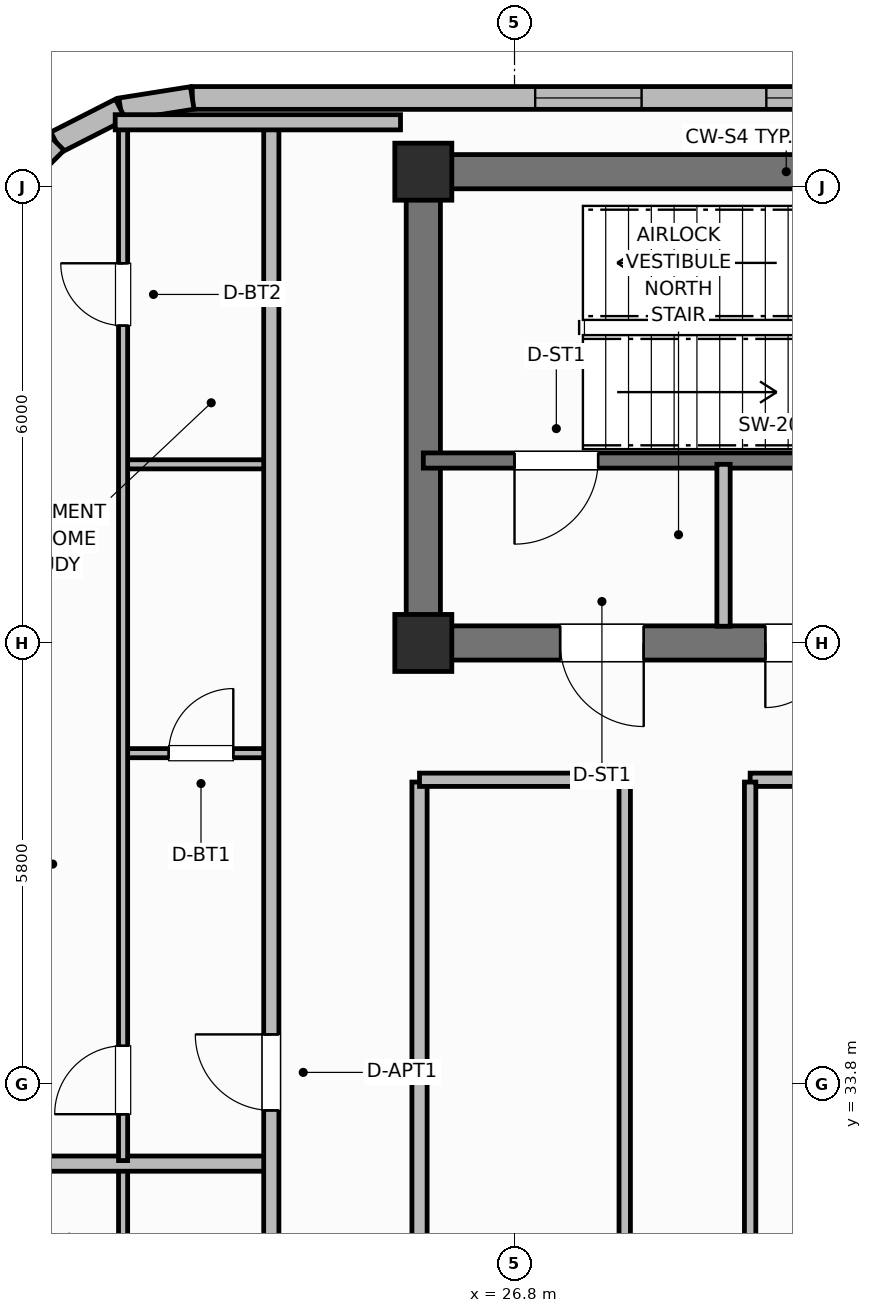
"""IFC4 building model, lengths in metres.
Left out: names, types, materials, properties, quantities, classifications, styles, units other than length and angle.
Written with IfcOpenShell. Run it as: python <this file> out.ifc"""

import sys

from ifc_helpers import new_model, si_unit, direction, frame, frame_2d, origin, origin_2d, place, context, subcontext, project, spatial, rectangle, extrude, element, fill, save


model = new_model("IFC4")
c1 = context("Model", 3, precision=1e-05, world=origin(), true_north=direction((0.0, 1.0)))
c2 = subcontext(c1, "Body", "Model", "MODEL_VIEW")
j1 = project(units=[si_unit("LENGTHUNIT", "METRE"), si_unit("PLANEANGLEUNIT", "RADIAN")], contexts=[c1])
p1 = place(None, origin())
s1 = spatial("IfcSite", under=j1, at=p1, CompositionType="ELEMENT")
p2 = place(p1, origin())
s2 = spatial("IfcBuilding", under=s1, at=p2, CompositionType="ELEMENT")
p3 = place(p2, frame((0.0, 0.0, 293.5)))
s3 = spatial("IfcBuildingStorey", under=s2, at=p3, CompositionType="ELEMENT", Elevation=293.5)
p4 = place(p3, frame((25.6, 45.8, 0.0), z_axis=(0.0, 0.0, 1.0), x_axis=(1.0, 0.0, 0.0)))
e1 = element("IfcWall", 1, at=p4, inside=s3, PredefinedType="SHEAR", context=c2, shape_type="SweptSolid", body=[
    extrude(rectangle(XDim=27.2, YDim=0.45, at=frame_2d((13.6, 0.0))), origin(), (0.0, 0.0, 1.0), 3.7),
])
p5 = place(p3, frame((25.6, 39.825, 0.0), z_axis=(0.0, 0.0, 1.0), x_axis=(0.0, 1.0, 0.0)))
e2 = element("IfcWall", 2, at=p5, inside=s3, PredefinedType="SHEAR", context=c2, shape_type="SweptSolid", body=[
    extrude(rectangle(XDim=5.75, YDim=0.45, at=frame_2d((2.875, 0.0))), origin(), (0.0, 0.0, 1.0), 3.7),
])
p6 = place(p3, frame((52.8, 39.6, 0.0), z_axis=(0.0, 0.0, 1.0), x_axis=(-1.0, 0.0, 0.0)))
e3 = element("IfcWall", 3, at=p6, inside=s3, PredefinedType="SHEAR", context=c2, shape_type="SweptSolid", body=[
    extrude(rectangle(XDim=27.2, YDim=0.45, at=frame_2d((13.6, 0.0))), origin(), (0.0, 0.0, 1.0), 3.7),
])
p7 = place(p6, frame((24.3, 0.0, 0.0)))
e4 = element("IfcOpeningElement", 4, at=p7, cuts=e3, PredefinedType="OPENING", context=c2, shape_type="SweptSolid", body=[
    extrude(rectangle(XDim=1.1, YDim=2.15, at=frame_2d((0.55, 1.075))), frame((0.0, 0.235, 0.0), z_axis=(0.0, -1.0, 0.0), x_axis=(1.0, 0.0, 0.0)), (0.0, 0.0, 1.0), 0.47),
])
p8 = place(p6, frame((21.85, 0.0, 0.0)))
e5 = element("IfcOpeningElement", 5, at=p8, cuts=e3, PredefinedType="OPENING", context=c2, shape_type="SweptSolid", body=[
    extrude(rectangle(XDim=0.85, YDim=2.1, at=frame_2d((0.425, 1.05))), frame((0.0, 0.235, 0.0), z_axis=(0.0, -1.0, 0.0), x_axis=(1.0, 0.0, 0.0)), (0.0, 0.0, 1.0), 0.47),
])
p9 = place(p6, frame((19.85, 0.0, 0.0)))
e6 = element("IfcOpeningElement", 6, at=p9, cuts=e3, PredefinedType="OPENING", context=c2, shape_type="SweptSolid", body=[
    extrude(rectangle(XDim=0.85, YDim=2.1, at=frame_2d((0.425, 1.05))), frame((0.0, 0.235, 0.0), z_axis=(0.0, -1.0, 0.0), x_axis=(1.0, 0.0, 0.0)), (0.0, 0.0, 1.0), 0.47),
])
p10 = place(p6, frame((15.1, 0.0, 0.0)))
e7 = element("IfcOpeningElement", 7, at=p10, cuts=e3, PredefinedType="OPENING", context=c2, shape_type="SweptSolid", body=[
    extrude(rectangle(XDim=1.2, YDim=2.15, at=frame_2d((0.6, 1.075))), frame((0.0, 0.235, 0.0), z_axis=(0.0, -1.0, 0.0), x_axis=(1.0, 0.0, 0.0)), (0.0, 0.0, 1.0), 0.47),
])
p11 = place(p6, frame((12.6, 0.0, 0.0)))
e8 = element("IfcOpeningElement", 8, at=p11, cuts=e3, PredefinedType="OPENING", context=c2, shape_type="SweptSolid", body=[
    extrude(rectangle(XDim=0.85, YDim=2.1, at=frame_2d((0.425, 1.05))), frame((0.0, 0.235, 0.0), z_axis=(0.0, -1.0, 0.0), x_axis=(1.0, 0.0, 0.0)), (0.0, 0.0, 1.0), 0.47),
])
p12 = place(p6, frame((10.85, 0.0, 0.0)))
e9 = element("IfcOpeningElement", 9, at=p12, cuts=e3, PredefinedType="OPENING", context=c2, shape_type="SweptSolid", body=[
    extrude(rectangle(XDim=0.85, YDim=2.1, at=frame_2d((0.425, 1.05))), frame((0.0, 0.235, 0.0), z_axis=(0.0, -1.0, 0.0), x_axis=(1.0, 0.0, 0.0)), (0.0, 0.0, 1.0), 0.47),
])
p13 = place(p6, frame((7.35, 0.0, 0.0)))
e10 = element("IfcOpeningElement", 10, at=p13, cuts=e3, PredefinedType="OPENING", context=c2, shape_type="SweptSolid", body=[
    extrude(rectangle(XDim=0.85, YDim=2.1, at=frame_2d((0.425, 1.05))), frame((0.0, 0.235, 0.0), z_axis=(0.0, -1.0, 0.0), x_axis=(1.0, 0.0, 0.0)), (0.0, 0.0, 1.0), 0.47),
])
p14 = place(p6, frame((4.2, 0.0, 0.0)))
e11 = element("IfcOpeningElement", 11, at=p14, cuts=e3, PredefinedType="OPENING", context=c2, shape_type="SweptSolid", body=[
    extrude(rectangle(XDim=1.3, YDim=2.2, at=frame_2d((0.65, 1.1))), frame((0.0, 0.235, 0.0), z_axis=(0.0, -1.0, 0.0), x_axis=(1.0, 0.0, 0.0)), (0.0, 0.0, 1.0), 0.47),
])
for number, where, z_axis, x_axis in (
    (12, (25.6, 39.6, 0.0), (0.0, 0.0, 1.0), (1.0, 0.0, 0.0)),
    (13, (25.6, 45.8, 0.0), (0.0, 0.0, 1.0), (1.0, 0.0, 0.0)),
):
    element("IfcColumn", number, at=place(p3, frame(where, z_axis=z_axis, x_axis=x_axis)), inside=s3, PredefinedType="COLUMN", context=c2, shape_type="SweptSolid", body=[
        extrude(rectangle(XDim=0.75, YDim=0.75, at=origin_2d()), origin(), (0.0, 0.0, 1.0), 3.7),
    ])
p15 = place(p3, frame((48.19, 46.77, 0.0), z_axis=(0.0, 0.0, 1.0), x_axis=(-1.0, 0.0, 0.0)))
e14 = element("IfcWall", 14, at=p15, inside=s3, PredefinedType="SOLIDWALL", context=c2, shape_type="SweptSolid", body=[
    extrude(rectangle(XDim=25.63, YDim=0.3, at=frame_2d((12.815, 0.0))), origin(), (0.0, 0.0, 1.0), 2.71),
])
p16 = place(p15, frame((1.471, 0.0, 0.74)))
e15 = element("IfcOpeningElement", 15, at=p16, cuts=e14, PredefinedType="OPENING", context=c2, shape_type="SweptSolid", body=[
    extrude(rectangle(XDim=1.4, YDim=1.85, at=frame_2d((0.7, 0.925))), frame((0.0, 0.16, 0.0), z_axis=(0.0, -1.0, 0.0), x_axis=(1.0, 0.0, 0.0)), (0.0, 0.0, 1.0), 0.32),
])
p17 = place(p15, frame((7.553, 0.0, 0.74)))
e16 = element("IfcOpeningElement", 16, at=p17, cuts=e14, PredefinedType="OPENING", context=c2, shape_type="SweptSolid", body=[
    extrude(rectangle(XDim=1.4, YDim=1.85, at=frame_2d((0.7, 0.925))), frame((0.0, 0.16, 0.0), z_axis=(0.0, -1.0, 0.0), x_axis=(1.0, 0.0, 0.0)), (0.0, 0.0, 1.0), 0.32),
])
p18 = place(p15, frame((10.244, 0.0, 0.74)))
e17 = element("IfcOpeningElement", 17, at=p18, cuts=e14, PredefinedType="OPENING", context=c2, shape_type="SweptSolid", body=[
    extrude(rectangle(XDim=1.4, YDim=1.85, at=frame_2d((0.7, 0.925))), frame((0.0, 0.16, 0.0), z_axis=(0.0, -1.0, 0.0), x_axis=(1.0, 0.0, 0.0)), (0.0, 0.0, 1.0), 0.32),
])
p19 = place(p15, frame((14.336, 0.0, 0.74)))
e18 = element("IfcOpeningElement", 18, at=p19, cuts=e14, PredefinedType="OPENING", context=c2, shape_type="SweptSolid", body=[
    extrude(rectangle(XDim=1.4, YDim=1.85, at=frame_2d((0.7, 0.925))), frame((0.0, 0.16, 0.0), z_axis=(0.0, -1.0, 0.0), x_axis=(1.0, 0.0, 0.0)), (0.0, 0.0, 1.0), 0.32),
])
p20 = place(p15, frame((16.677, 0.0, 0.74)))
e19 = element("IfcOpeningElement", 19, at=p20, cuts=e14, PredefinedType="OPENING", context=c2, shape_type="SweptSolid", body=[
    extrude(rectangle(XDim=1.4, YDim=1.85, at=frame_2d((0.7, 0.925))), frame((0.0, 0.16, 0.0), z_axis=(0.0, -1.0, 0.0), x_axis=(1.0, 0.0, 0.0)), (0.0, 0.0, 1.0), 0.32),
])
p21 = place(p15, frame((19.718, 0.0, 0.74)))
e20 = element("IfcOpeningElement", 20, at=p21, cuts=e14, PredefinedType="OPENING", context=c2, shape_type="SweptSolid", body=[
    extrude(rectangle(XDim=1.4, YDim=1.85, at=frame_2d((0.7, 0.925))), frame((0.0, 0.16, 0.0), z_axis=(0.0, -1.0, 0.0), x_axis=(1.0, 0.0, 0.0)), (0.0, 0.0, 1.0), 0.32),
])
p22 = place(p3, frame((22.56, 46.77, 0.0), z_axis=(0.0, 0.0, 1.0), x_axis=(-0.987669453596, -0.156553666304, 0.0)))
e21 = element("IfcWall", 21, at=p22, inside=s3, PredefinedType="SOLIDWALL", context=c2, shape_type="SweptSolid", body=[
    extrude(rectangle(XDim=0.954, YDim=0.3, at=frame_2d((0.477, 0.0))), origin(), (0.0, 0.0, 1.0), 2.71),
])
p23 = place(p3, frame((21.617, 46.621, 0.0), z_axis=(0.0, 0.0, 1.0), x_axis=(-0.891023873617, -0.45395644796, 0.0)))
e22 = element("IfcWall", 22, at=p23, inside=s3, PredefinedType="SOLIDWALL", context=c2, shape_type="SweptSolid", body=[
    extrude(rectangle(XDim=0.954, YDim=0.3, at=frame_2d((0.477, 0.0))), origin(), (0.0, 0.0, 1.0), 2.71),
])
p24 = place(p3, frame((20.767, 46.188, 0.0), z_axis=(0.0, 0.0, 1.0), x_axis=(-0.707106781187, -0.707106781187, 0.0)))
e23 = element("IfcWall", 23, at=p24, inside=s3, PredefinedType="SOLIDWALL", context=c2, shape_type="SweptSolid", body=[
    extrude(rectangle(XDim=0.954, YDim=0.3, at=frame_2d((0.477, 0.0))), origin(), (0.0, 0.0, 1.0), 2.71),
])
p25 = place(p3, frame((35.15, 42.0, 0.0), z_axis=(0.0, 0.0, 1.0), x_axis=(-1.0, 0.0, 0.0)))
e24 = element("IfcWall", 24, at=p25, inside=s3, PredefinedType="SHEAR", context=c2, shape_type="SweptSolid", body=[
    extrude(rectangle(XDim=9.55, YDim=0.2, at=frame_2d((4.775, 0.0))), origin(), (0.0, 0.0, 1.0), 3.7),
])
p26 = place(p25, frame((7.25, 0.0, 0.0)))
e25 = element("IfcOpeningElement", 25, at=p26, cuts=e24, PredefinedType="OPENING", context=c2, shape_type="SweptSolid", body=[
    extrude(rectangle(XDim=1.1, YDim=2.15, at=frame_2d((0.55, 1.075))), frame((0.0, 0.11, 0.0), z_axis=(0.0, -1.0, 0.0), x_axis=(1.0, 0.0, 0.0)), (0.0, 0.0, 1.0), 0.22),
])
p27 = place(p3, frame((29.55, 39.82, 0.0), z_axis=(0.0, 0.0, 1.0), x_axis=(0.0, 1.0, 0.0)))
e26 = element("IfcWall", 26, at=p27, inside=s3, PredefinedType="PARTITIONING", context=c2, shape_type="SweptSolid", body=[
    extrude(rectangle(XDim=2.13, YDim=0.175, at=frame_2d((1.065, 0.0))), origin(), (0.0, 0.0, 1.0), 2.54),
])
p28 = place(p3, frame((25.55, 18.63, 0.0), z_axis=(0.0, 0.0, 1.0), x_axis=(0.0, 1.0, 0.0)))
e27 = element("IfcWall", 27, at=p28, inside=s3, PredefinedType="PARTITIONING", context=c2, shape_type="SweptSolid", body=[
    extrude(rectangle(XDim=19.14, YDim=0.2, at=frame_2d((9.57, 0.0))), origin(), (0.0, 0.0, 1.0), 2.54),
])
p29 = place(p3, frame((25.55, 37.8, 0.0), z_axis=(0.0, 0.0, 1.0), x_axis=(1.0, 0.0, 0.0)))
e28 = element("IfcWall", 28, at=p29, inside=s3, PredefinedType="PARTITIONING", context=c2, shape_type="SweptSolid", body=[
    extrude(rectangle(XDim=2.7, YDim=0.175, at=frame_2d((1.35, 0.0))), origin(), (0.0, 0.0, 1.0), 2.54),
])
p30 = place(p3, frame((29.9, 37.8, 0.0), z_axis=(0.0, 0.0, 1.0), x_axis=(1.0, 0.0, 0.0)))
e29 = element("IfcWall", 29, at=p30, inside=s3, PredefinedType="PARTITIONING", context=c2, shape_type="SweptSolid", body=[
    extrude(rectangle(XDim=22.95, YDim=0.175, at=frame_2d((11.475, 0.0))), origin(), (0.0, 0.0, 1.0), 2.54),
])
p31 = place(p3, frame((28.25, 18.63, 0.0), z_axis=(0.0, 0.0, 1.0), x_axis=(0.0, 1.0, 0.0)))
e30 = element("IfcWall", 30, at=p31, inside=s3, PredefinedType="PARTITIONING", context=c2, shape_type="SweptSolid", body=[
    extrude(rectangle(XDim=19.14, YDim=0.15, at=frame_2d((9.57, 0.0))), origin(), (0.0, 0.0, 1.0), 2.54),
])
p32 = place(p31, frame((3.0, 0.0, 0.0)))
e31 = element("IfcOpeningElement", 31, at=p32, cuts=e30, PredefinedType="OPENING", context=c2, shape_type="SweptSolid", body=[
    extrude(rectangle(XDim=0.9, YDim=2.1, at=frame_2d((0.45, 1.05))), frame((0.0, 0.085, 0.0), z_axis=(0.0, -1.0, 0.0), x_axis=(1.0, 0.0, 0.0)), (0.0, 0.0, 1.0), 0.17),
])
p33 = place(p31, frame((11.5, 0.0, 0.0)))
e32 = element("IfcOpeningElement", 32, at=p33, cuts=e30, PredefinedType="OPENING", context=c2, shape_type="SweptSolid", body=[
    extrude(rectangle(XDim=0.9, YDim=2.1, at=frame_2d((0.45, 1.05))), frame((0.0, 0.085, 0.0), z_axis=(0.0, -1.0, 0.0), x_axis=(1.0, 0.0, 0.0)), (0.0, 0.0, 1.0), 0.17),
])
p34 = place(p3, frame((29.9, 18.63, 0.0), z_axis=(0.0, 0.0, 1.0), x_axis=(0.0, 1.0, 0.0)))
e33 = element("IfcWall", 33, at=p34, inside=s3, PredefinedType="PARTITIONING", context=c2, shape_type="SweptSolid", body=[
    extrude(rectangle(XDim=19.14, YDim=0.15, at=frame_2d((9.57, 0.0))), origin(), (0.0, 0.0, 1.0), 2.54),
])
p35 = place(p34, frame((2.2, 0.0, 0.0)))
e34 = element("IfcOpeningElement", 34, at=p35, cuts=e33, PredefinedType="OPENING", context=c2, shape_type="SweptSolid", body=[
    extrude(rectangle(XDim=1.0, YDim=2.15, at=frame_2d((0.5, 1.075))), frame((0.0, 0.085, 0.0), z_axis=(0.0, -1.0, 0.0), x_axis=(1.0, 0.0, 0.0)), (0.0, 0.0, 1.0), 0.17),
])
p36 = place(p34, frame((8.89, 0.0, 0.0)))
e35 = element("IfcOpeningElement", 35, at=p36, cuts=e33, PredefinedType="OPENING", context=c2, shape_type="SweptSolid", body=[
    extrude(rectangle(XDim=1.0, YDim=2.15, at=frame_2d((0.5, 1.075))), frame((0.0, 0.085, 0.0), z_axis=(0.0, -1.0, 0.0), x_axis=(1.0, 0.0, 0.0)), (0.0, 0.0, 1.0), 0.17),
])
p37 = place(p3, frame((21.65, 9.99, 0.0), z_axis=(0.0, 0.0, 1.0), x_axis=(0.0, 1.0, 0.0)))
e36 = element("IfcWall", 36, at=p37, inside=s3, PredefinedType="PARTITIONING", context=c2, shape_type="SweptSolid", body=[
    extrude(rectangle(XDim=22.72, YDim=0.12, at=frame_2d((11.36, 0.0))), origin(), (0.0, 0.0, 1.0), 2.54),
])
p38 = place(p37, frame((0.41, 0.0, 0.0)))
e37 = element("IfcOpeningElement", 37, at=p38, cuts=e36, PredefinedType="OPENING", context=c2, shape_type="SweptSolid", body=[
    extrude(rectangle(XDim=0.9, YDim=2.1, at=frame_2d((0.45, 1.05))), frame((0.0, 0.07, 0.0), z_axis=(0.0, -1.0, 0.0), x_axis=(1.0, 0.0, 0.0)), (0.0, 0.0, 1.0), 0.14),
])
p39 = place(p37, frame((15.535, 0.0, 0.0)))
e38 = element("IfcOpeningElement", 38, at=p39, cuts=e36, PredefinedType="OPENING", context=c2, shape_type="SweptSolid", body=[
    extrude(rectangle(XDim=0.82, YDim=2.08, at=frame_2d((0.41, 1.04))), frame((0.0, 0.07, 0.0), z_axis=(0.0, -1.0, 0.0), x_axis=(1.0, 0.0, 0.0)), (0.0, 0.0, 1.0), 0.14),
])
p40 = place(p3, frame((19.53, 32.75, 0.0), z_axis=(0.0, 0.0, 1.0), x_axis=(1.0, 0.0, 0.0)))
e39 = element("IfcWall", 39, at=p40, inside=s3, PredefinedType="PARTITIONING", context=c2, shape_type="SweptSolid", body=[
    extrude(rectangle(XDim=4.07, YDim=0.2, at=frame_2d((2.035, 0.0))), origin(), (0.0, 0.0, 1.0), 2.54),
])
p41 = place(p3, frame((21.65, 38.15, 0.0), z_axis=(0.0, 0.0, 1.0), x_axis=(1.0, 0.0, 0.0)))
e40 = element("IfcWall", 40, at=p41, inside=s3, PredefinedType="PARTITIONING", context=c2, shape_type="SweptSolid", body=[
    extrude(rectangle(XDim=1.95, YDim=0.12, at=frame_2d((0.975, 0.0))), origin(), (0.0, 0.0, 1.0), 2.54),
])
p42 = place(p41, frame((0.6, 0.0, 0.0)))
e41 = element("IfcOpeningElement", 41, at=p42, cuts=e40, PredefinedType="OPENING", context=c2, shape_type="SweptSolid", body=[
    extrude(rectangle(XDim=0.85, YDim=2.1, at=frame_2d((0.425, 1.05))), frame((0.0, 0.07, 0.0), z_axis=(0.0, -1.0, 0.0), x_axis=(1.0, 0.0, 0.0)), (0.0, 0.0, 1.0), 0.14),
])
p43 = place(p3, frame((21.65, 41.95, 0.0), z_axis=(0.0, 0.0, 1.0), x_axis=(1.0, 0.0, 0.0)))
e42 = element("IfcWall", 42, at=p43, inside=s3, PredefinedType="PARTITIONING", context=c2, shape_type="SweptSolid", body=[
    extrude(rectangle(XDim=1.95, YDim=0.12, at=frame_2d((0.975, 0.0))), origin(), (0.0, 0.0, 1.0), 2.54),
])
p44 = place(p3, frame((21.65, 32.79, 0.0), z_axis=(0.0, 0.0, 1.0), x_axis=(0.0, 1.0, 0.0)))
e43 = element("IfcWall", 43, at=p44, inside=s3, PredefinedType="PARTITIONING", context=c2, shape_type="SweptSolid", body=[
    extrude(rectangle(XDim=13.62, YDim=0.12, at=frame_2d((6.81, 0.0))), origin(), (0.0, 0.0, 1.0), 2.54),
])
p45 = place(p44, frame((0.61, 0.0, 0.0)))
e44 = element("IfcOpeningElement", 44, at=p45, cuts=e43, PredefinedType="OPENING", context=c2, shape_type="SweptSolid", body=[
    extrude(rectangle(XDim=0.9, YDim=2.1, at=frame_2d((0.45, 1.05))), frame((0.0, 0.07, 0.0), z_axis=(0.0, -1.0, 0.0), x_axis=(1.0, 0.0, 0.0)), (0.0, 0.0, 1.0), 0.14),
])
p46 = place(p44, frame((10.985, 0.0, 0.0)))
e45 = element("IfcOpeningElement", 45, at=p46, cuts=e43, PredefinedType="OPENING", context=c2, shape_type="SweptSolid", body=[
    extrude(rectangle(XDim=0.82, YDim=2.08, at=frame_2d((0.41, 1.04))), frame((0.0, 0.07, 0.0), z_axis=(0.0, -1.0, 0.0), x_axis=(1.0, 0.0, 0.0)), (0.0, 0.0, 1.0), 0.14),
])
p47 = place(p3, frame((23.6, 9.95, 0.0), z_axis=(0.0, 0.0, 1.0), x_axis=(0.0, 1.0, 0.0)))
e46 = element("IfcWall", 46, at=p47, inside=s3, PredefinedType="PARTITIONING", context=c2, shape_type="SweptSolid", body=[
    extrude(rectangle(XDim=36.5, YDim=0.2, at=frame_2d((18.25, 0.0))), origin(), (0.0, 0.0, 1.0), 2.54),
])
p48 = place(p47, frame((3.25, 0.0, 0.0)))
e47 = element("IfcOpeningElement", 47, at=p48, cuts=e46, PredefinedType="OPENING", context=c2, shape_type="SweptSolid", body=[
    extrude(rectangle(XDim=1.0, YDim=2.15, at=frame_2d((0.5, 1.075))), frame((0.0, 0.11, 0.0), z_axis=(0.0, -1.0, 0.0), x_axis=(1.0, 0.0, 0.0)), (0.0, 0.0, 1.0), 0.22),
])
p49 = place(p47, frame((23.5, 0.0, 0.0)))
e48 = element("IfcOpeningElement", 48, at=p49, cuts=e46, PredefinedType="OPENING", context=c2, shape_type="SweptSolid", body=[
    extrude(rectangle(XDim=1.0, YDim=2.15, at=frame_2d((0.5, 1.075))), frame((0.0, 0.11, 0.0), z_axis=(0.0, -1.0, 0.0), x_axis=(1.0, 0.0, 0.0)), (0.0, 0.0, 1.0), 0.22),
])
p50 = place(p3, frame((21.546, 46.45, 0.0), z_axis=(0.0, 0.0, 1.0), x_axis=(1.0, 0.0, 0.0)))
e49 = element("IfcWall", 49, at=p50, inside=s3, PredefinedType="PARTITIONING", context=c2, shape_type="SweptSolid", body=[
    extrude(rectangle(XDim=3.754, YDim=0.2, at=frame_2d((1.877, 0.0))), origin(), (0.0, 0.0, 1.0), 2.54),
])
p51 = place(p20, origin())
e50 = element("IfcWindow", 50, at=p51, inside=s3, PartitioningType="SINGLE_PANEL", PredefinedType="WINDOW", context=c2, shape_type="SweptSolid", body=[
    extrude(rectangle(XDim=1.4, YDim=1.85, at=frame_2d((0.7, 0.925))), frame((0.0, 0.03, 0.0), z_axis=(0.0, -1.0, 0.0), x_axis=(1.0, 0.0, 0.0)), (0.0, 0.0, 1.0), 0.06),
])
fill(e19, e50)
p52 = place(p21, origin())
e51 = element("IfcWindow", 51, at=p52, inside=s3, PartitioningType="SINGLE_PANEL", PredefinedType="WINDOW", context=c2, shape_type="SweptSolid", body=[
    extrude(rectangle(XDim=1.4, YDim=1.85, at=frame_2d((0.7, 0.925))), frame((0.0, 0.03, 0.0), z_axis=(0.0, -1.0, 0.0), x_axis=(1.0, 0.0, 0.0)), (0.0, 0.0, 1.0), 0.06),
])
fill(e20, e51)
p53 = place(p26, origin())
e52 = element("IfcDoor", 52, at=p53, inside=s3, OperationType="SINGLE_SWING_RIGHT", PredefinedType="DOOR", context=c2, shape_type="SweptSolid", body=[
    extrude(rectangle(XDim=1.1, YDim=2.15, at=frame_2d((0.55, 1.075))), frame((0.0, 0.025, 0.0), z_axis=(0.0, -1.0, 0.0), x_axis=(1.0, 0.0, 0.0)), (0.0, 0.0, 1.0), 0.05),
])
fill(e25, e52)
p54 = place(p42, origin())
e53 = element("IfcDoor", 53, at=p54, inside=s3, OperationType="SINGLE_SWING_RIGHT", PredefinedType="DOOR", context=c2, shape_type="SweptSolid", body=[
    extrude(rectangle(XDim=0.85, YDim=2.1, at=frame_2d((0.425, 1.05))), frame((0.0, 0.025, 0.0), z_axis=(0.0, -1.0, 0.0), x_axis=(1.0, 0.0, 0.0)), (0.0, 0.0, 1.0), 0.05),
])
fill(e41, e53)
p55 = place(p45, origin())
e54 = element("IfcDoor", 54, at=p55, inside=s3, OperationType="SINGLE_SWING_LEFT", PredefinedType="DOOR", context=c2, shape_type="SweptSolid", body=[
    extrude(rectangle(XDim=0.9, YDim=2.1, at=frame_2d((0.45, 1.05))), frame((0.0, 0.025, 0.0), z_axis=(0.0, -1.0, 0.0), x_axis=(1.0, 0.0, 0.0)), (0.0, 0.0, 1.0), 0.05),
])
fill(e44, e54)
p56 = place(p46, origin())
e55 = element("IfcDoor", 55, at=p56, inside=s3, OperationType="SINGLE_SWING_RIGHT", PredefinedType="DOOR", context=c2, shape_type="SweptSolid", body=[
    extrude(rectangle(XDim=0.82, YDim=2.08, at=frame_2d((0.41, 1.04))), frame((0.0, 0.025, 0.0), z_axis=(0.0, -1.0, 0.0), x_axis=(1.0, 0.0, 0.0)), (0.0, 0.0, 1.0), 0.05),
])
fill(e45, e55)
p57 = place(p49, origin())
e56 = element("IfcDoor", 56, at=p57, inside=s3, OperationType="SINGLE_SWING_RIGHT", PredefinedType="DOOR", context=c2, shape_type="SweptSolid", body=[
    extrude(rectangle(XDim=1.0, YDim=2.15, at=frame_2d((0.5, 1.075))), frame((0.0, 0.025, 0.0), z_axis=(0.0, -1.0, 0.0), x_axis=(1.0, 0.0, 0.0)), (0.0, 0.0, 1.0), 0.05),
])
fill(e48, e56)
p58 = place(p7, origin())
e57 = element("IfcDoor", 57, at=p58, inside=s3, OperationType="SINGLE_SWING_LEFT", PredefinedType="DOOR", context=c2, shape_type="SweptSolid", body=[
    extrude(rectangle(XDim=1.1, YDim=2.15, at=frame_2d((0.55, 1.075))), frame((0.0, 0.025, 0.0), z_axis=(0.0, -1.0, 0.0), x_axis=(1.0, 0.0, 0.0)), (0.0, 0.0, 1.0), 0.05),
])
fill(e4, e57)
p59 = place(p8, origin())
e58 = element("IfcDoor", 58, at=p59, inside=s3, OperationType="SINGLE_SWING_RIGHT", PredefinedType="DOOR", context=c2, shape_type="SweptSolid", body=[
    extrude(rectangle(XDim=0.85, YDim=2.1, at=frame_2d((0.425, 1.05))), frame((0.0, 0.025, 0.0), z_axis=(0.0, -1.0, 0.0), x_axis=(1.0, 0.0, 0.0)), (0.0, 0.0, 1.0), 0.05),
])
fill(e5, e58)
save(model, sys.argv[1])
